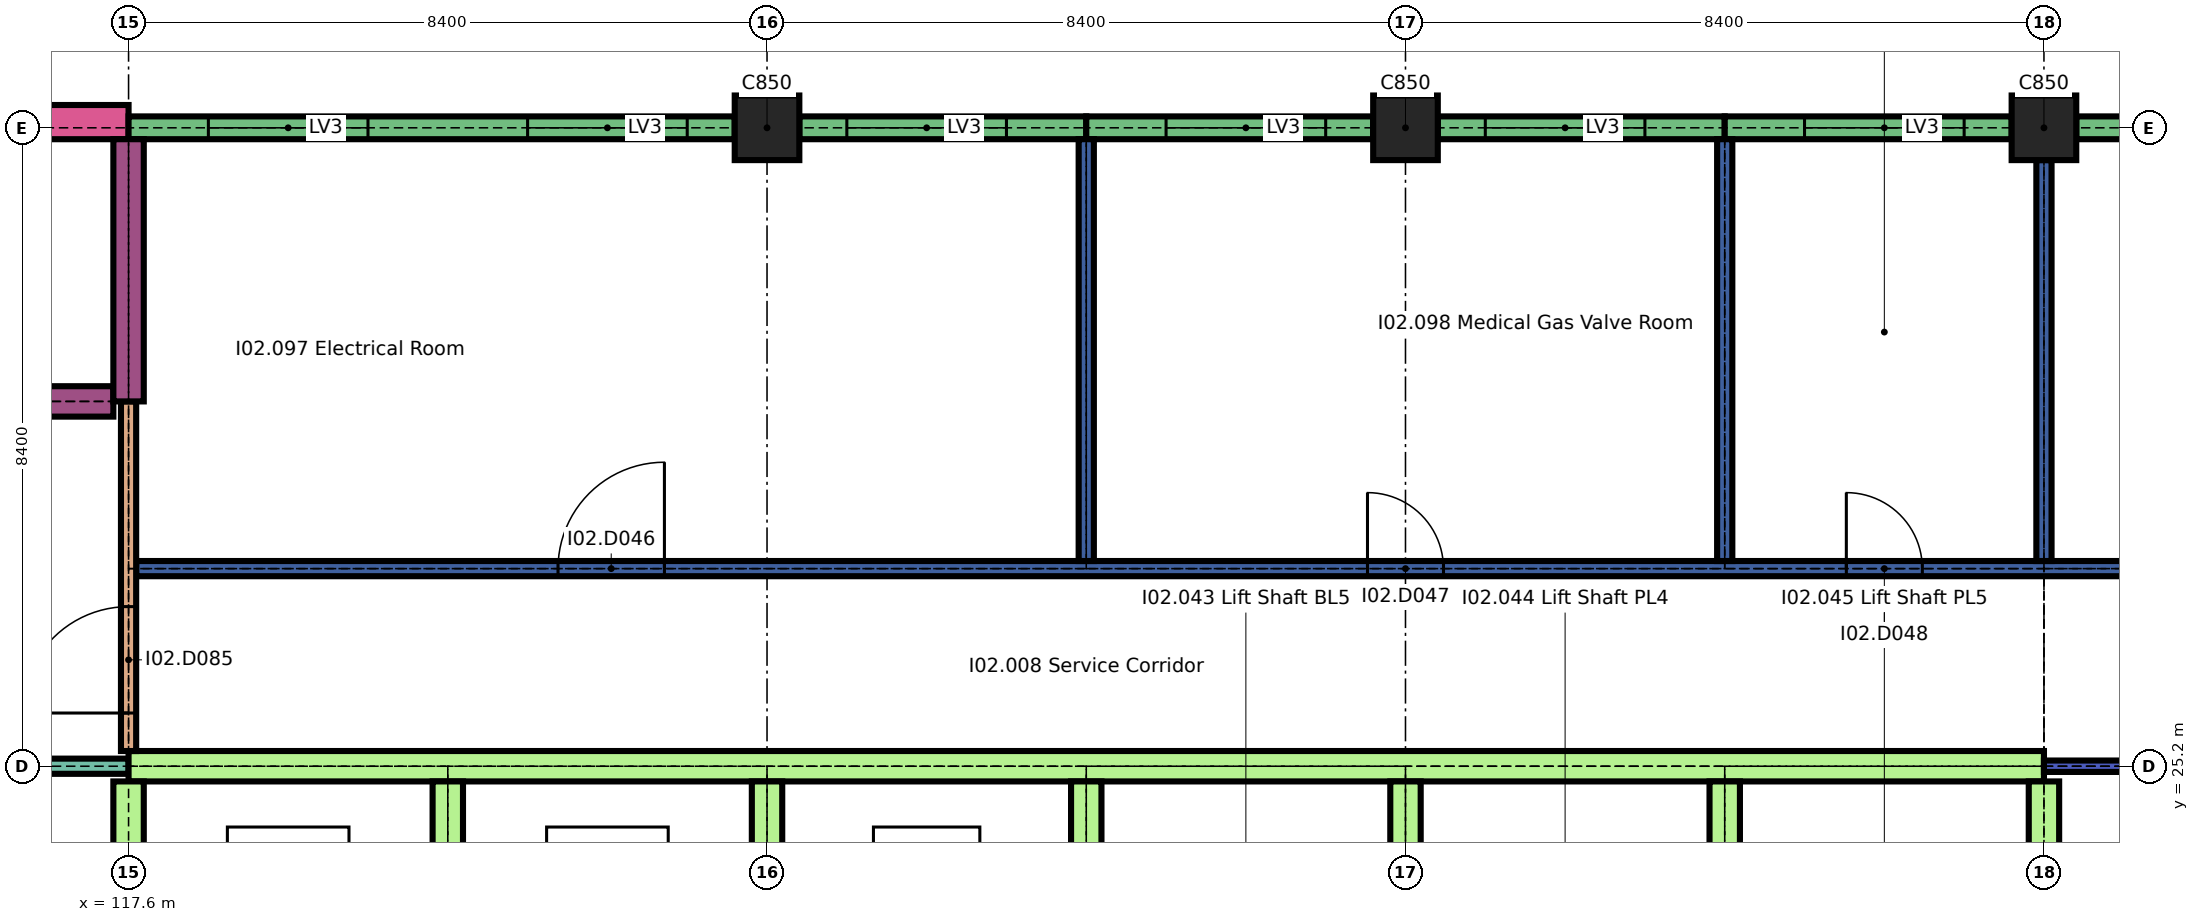
"""IFC4 building model, lengths in metres.
Left out: names, types, materials, properties, quantities, classifications, styles, units other than length and angle.
Written with IfcOpenShell. Run it as: python <this file> out.ifc"""

import sys

from ifc_helpers import new_model, si_unit, direction, frame, frame_2d, origin, origin_2d, place, context, subcontext, project, spatial, rectangle, extrude, element, fill, save


model = new_model("IFC4")
c1 = context("Model", 3, precision=1e-05, world=origin(), true_north=direction((0.0, 1.0)))
c2 = subcontext(c1, "Body", "Model", "MODEL_VIEW")
j1 = project(units=[si_unit("LENGTHUNIT", "METRE"), si_unit("PLANEANGLEUNIT", "RADIAN")], contexts=[c1])
p1 = place(None, origin())
s1 = spatial("IfcSite", under=j1, at=p1, CompositionType="ELEMENT")
p2 = place(p1, origin())
s2 = spatial("IfcBuilding", under=s1, at=p2, CompositionType="ELEMENT")
p3 = place(p2, frame((0.0, 0.0, 12.9)))
s3 = spatial("IfcBuildingStorey", under=s2, at=p3, CompositionType="ELEMENT", Elevation=12.9)
for number, where, z_axis, x_axis in (
    (1, (126.0, 33.6, 0.0), (0.0, 0.0, 1.0), (1.0, 0.0, 0.0)),
    (2, (134.4, 33.6, 0.0), (0.0, 0.0, 1.0), (1.0, 0.0, 0.0)),
    (3, (142.8, 33.6, 0.0), (0.0, 0.0, 1.0), (1.0, 0.0, 0.0)),
):
    element("IfcColumn", number, at=place(p3, frame(where, z_axis=z_axis, x_axis=x_axis)), inside=s3, PredefinedType="COLUMN", context=c2, shape_type="SweptSolid", body=[
        extrude(rectangle(XDim=0.85, YDim=0.85, at=origin_2d()), origin(), (0.0, 0.0, 1.0), 2.04),
    ])
p4 = place(p3, frame((113.75, 33.675, 0.0), z_axis=(0.0, 0.0, 1.0), x_axis=(1.0, 0.0, 0.0)))
e4 = element("IfcWall", 4, at=p4, inside=s3, PredefinedType="SOLIDWALL", context=c2, shape_type="SweptSolid", body=[
    extrude(rectangle(XDim=3.85, YDim=0.45, at=frame_2d((1.925, 0.0))), origin(), (0.0, 0.0, 1.0), 2.1),
])
p5 = place(p3, frame((117.6, 33.6, 0.0), z_axis=(0.0, 0.0, 1.0), x_axis=(1.0, 0.0, 0.0)))
e5 = element("IfcWall", 5, at=p5, inside=s3, PredefinedType="SOLIDWALL", context=c2, shape_type="SweptSolid", body=[
    extrude(rectangle(XDim=7.975, YDim=0.3, at=frame_2d((3.987, 0.0))), origin(), (0.0, 0.0, 1.0), 1.74),
])
p6 = place(p5, frame((1.05, 0.0, 0.6)))
e6 = element("IfcOpeningElement", 6, at=p6, cuts=e5, PredefinedType="OPENING", context=c2, shape_type="SweptSolid", body=[
    extrude(rectangle(XDim=2.1, YDim=1.05, at=frame_2d((1.05, 0.525))), frame((0.0, 0.16, 0.0), z_axis=(0.0, -1.0, 0.0), x_axis=(1.0, 0.0, 0.0)), (0.0, 0.0, 1.0), 0.32),
])
p7 = place(p5, frame((5.25, 0.0, 0.6)))
e7 = element("IfcOpeningElement", 7, at=p7, cuts=e5, PredefinedType="OPENING", context=c2, shape_type="SweptSolid", body=[
    extrude(rectangle(XDim=2.1, YDim=1.05, at=frame_2d((1.05, 0.525))), frame((0.0, 0.16, 0.0), z_axis=(0.0, -1.0, 0.0), x_axis=(1.0, 0.0, 0.0)), (0.0, 0.0, 1.0), 0.32),
])
p8 = place(p3, frame((126.425, 33.6, 0.0), z_axis=(0.0, 0.0, 1.0), x_axis=(1.0, 0.0, 0.0)))
e8 = element("IfcWall", 8, at=p8, inside=s3, PredefinedType="SOLIDWALL", context=c2, shape_type="SweptSolid", body=[
    extrude(rectangle(XDim=3.775, YDim=0.3, at=frame_2d((1.887, 0.0))), origin(), (0.0, 0.0, 1.0), 1.74),
])
p9 = place(p8, frame((0.625, 0.0, 0.6)))
e9 = element("IfcOpeningElement", 9, at=p9, cuts=e8, PredefinedType="OPENING", context=c2, shape_type="SweptSolid", body=[
    extrude(rectangle(XDim=2.1, YDim=1.05, at=frame_2d((1.05, 0.525))), frame((0.0, 0.16, 0.0), z_axis=(0.0, -1.0, 0.0), x_axis=(1.0, 0.0, 0.0)), (0.0, 0.0, 1.0), 0.32),
])
p10 = place(p3, frame((130.2, 33.6, 0.0), z_axis=(0.0, 0.0, 1.0), x_axis=(1.0, 0.0, 0.0)))
e10 = element("IfcWall", 10, at=p10, inside=s3, PredefinedType="SOLIDWALL", context=c2, shape_type="SweptSolid", body=[
    extrude(rectangle(XDim=3.775, YDim=0.3, at=frame_2d((1.888, 0.0))), origin(), (0.0, 0.0, 1.0), 1.74),
])
p11 = place(p10, frame((1.05, 0.0, 0.6)))
e11 = element("IfcOpeningElement", 11, at=p11, cuts=e10, PredefinedType="OPENING", context=c2, shape_type="SweptSolid", body=[
    extrude(rectangle(XDim=2.1, YDim=1.05, at=frame_2d((1.05, 0.525))), frame((0.0, 0.16, 0.0), z_axis=(0.0, -1.0, 0.0), x_axis=(1.0, 0.0, 0.0)), (0.0, 0.0, 1.0), 0.32),
])
p12 = place(p3, frame((134.825, 33.6, 0.0), z_axis=(0.0, 0.0, 1.0), x_axis=(1.0, 0.0, 0.0)))
e12 = element("IfcWall", 12, at=p12, inside=s3, PredefinedType="SOLIDWALL", context=c2, shape_type="SweptSolid", body=[
    extrude(rectangle(XDim=3.775, YDim=0.3, at=frame_2d((1.888, 0.0))), origin(), (0.0, 0.0, 1.0), 1.74),
])
p13 = place(p12, frame((0.625, 0.0, 0.6)))
e13 = element("IfcOpeningElement", 13, at=p13, cuts=e12, PredefinedType="OPENING", context=c2, shape_type="SweptSolid", body=[
    extrude(rectangle(XDim=2.1, YDim=1.05, at=frame_2d((1.05, 0.525))), frame((0.0, 0.16, 0.0), z_axis=(0.0, -1.0, 0.0), x_axis=(1.0, 0.0, 0.0)), (0.0, 0.0, 1.0), 0.32),
])
p14 = place(p3, frame((138.6, 33.6, 0.0), z_axis=(0.0, 0.0, 1.0), x_axis=(1.0, 0.0, 0.0)))
e14 = element("IfcWall", 14, at=p14, inside=s3, PredefinedType="SOLIDWALL", context=c2, shape_type="SweptSolid", body=[
    extrude(rectangle(XDim=3.775, YDim=0.3, at=frame_2d((1.887, 0.0))), origin(), (0.0, 0.0, 1.0), 1.74),
])
p15 = place(p14, frame((1.05, 0.0, 0.6)))
e15 = element("IfcOpeningElement", 15, at=p15, cuts=e14, PredefinedType="OPENING", context=c2, shape_type="SweptSolid", body=[
    extrude(rectangle(XDim=2.1, YDim=1.05, at=frame_2d((1.05, 0.525))), frame((0.0, 0.16, 0.0), z_axis=(0.0, -1.0, 0.0), x_axis=(1.0, 0.0, 0.0)), (0.0, 0.0, 1.0), 0.32),
])
p16 = place(p3, frame((143.225, 33.6, 0.0), z_axis=(0.0, 0.0, 1.0), x_axis=(1.0, 0.0, 0.0)))
e16 = element("IfcWall", 16, at=p16, inside=s3, PredefinedType="SOLIDWALL", context=c2, shape_type="SweptSolid", body=[
    extrude(rectangle(XDim=7.55, YDim=0.3, at=frame_2d((3.775, 0.0))), origin(), (0.0, 0.0, 1.0), 1.74),
])
p17 = place(p16, frame((0.625, 0.0, 0.6)))
e17 = element("IfcOpeningElement", 17, at=p17, cuts=e16, PredefinedType="OPENING", context=c2, shape_type="SweptSolid", body=[
    extrude(rectangle(XDim=2.1, YDim=1.05, at=frame_2d((1.05, 0.525))), frame((0.0, 0.16, 0.0), z_axis=(0.0, -1.0, 0.0), x_axis=(1.0, 0.0, 0.0)), (0.0, 0.0, 1.0), 0.32),
])
p18 = place(p3, frame((109.2, 25.2, 0.0), z_axis=(0.0, 0.0, 1.0), x_axis=(1.0, 0.0, 0.0)))
e18 = element("IfcWall", 18, at=p18, inside=s3, PredefinedType="PARTITIONING", context=c2, shape_type="SweptSolid", body=[
    extrude(rectangle(XDim=8.4, YDim=0.2, at=frame_2d((4.2, 0.0))), origin(), (0.0, 0.0, 1.0), 2.04),
])
p19 = place(p3, frame((117.6, 25.2, 0.0), z_axis=(0.0, 0.0, 1.0), x_axis=(1.0, 0.0, 0.0)))
e19 = element("IfcWall", 19, at=p19, inside=s3, PredefinedType="SHEAR", context=c2, shape_type="SweptSolid", body=[
    extrude(rectangle(XDim=25.2, YDim=0.4, at=frame_2d((12.6, 0.0))), origin(), (0.0, 0.0, 1.0), 2.04),
])
p20 = place(p3, frame((142.8, 25.2, 0.0), z_axis=(0.0, 0.0, 1.0), x_axis=(1.0, 0.0, 0.0)))
e20 = element("IfcWall", 20, at=p20, inside=s3, PredefinedType="PARTITIONING", context=c2, shape_type="SweptSolid", body=[
    extrude(rectangle(XDim=7.975, YDim=0.15, at=frame_2d((3.987, 0.0))), origin(), (0.0, 0.0, 1.0), 2.04),
])
p21 = place(p3, frame((117.7, 27.8, 0.0), z_axis=(0.0, 0.0, 1.0), x_axis=(1.0, 0.0, 0.0)))
e21 = element("IfcWall", 21, at=p21, inside=s3, PredefinedType="SOLIDWALL", context=c2, shape_type="SweptSolid", body=[
    extrude(rectangle(XDim=39.4, YDim=0.2, at=frame_2d((19.7, 0.0))), origin(), (0.0, 0.0, 1.0), 2.1),
])
p22 = place(p21, frame((5.55, 0.0, 0.0)))
e22 = element("IfcOpeningElement", 22, at=p22, cuts=e21, PredefinedType="OPENING", context=c2, shape_type="SweptSolid", body=[
    extrude(rectangle(XDim=1.4, YDim=2.0, at=frame_2d((0.7, 1.0))), frame((0.0, 0.11, 0.0), z_axis=(0.0, -1.0, 0.0), x_axis=(1.0, 0.0, 0.0)), (0.0, 0.0, 1.0), 0.22),
])
p23 = place(p21, frame((16.2, 0.0, 0.0)))
e23 = element("IfcOpeningElement", 23, at=p23, cuts=e21, PredefinedType="OPENING", context=c2, shape_type="SweptSolid", body=[
    extrude(rectangle(XDim=1.0, YDim=2.0, at=frame_2d((0.5, 1.0))), frame((0.0, 0.11, 0.0), z_axis=(0.0, -1.0, 0.0), x_axis=(1.0, 0.0, 0.0)), (0.0, 0.0, 1.0), 0.22),
])
p24 = place(p21, frame((22.5, 0.0, 0.0)))
e24 = element("IfcOpeningElement", 24, at=p24, cuts=e21, PredefinedType="OPENING", context=c2, shape_type="SweptSolid", body=[
    extrude(rectangle(XDim=1.0, YDim=2.0, at=frame_2d((0.5, 1.0))), frame((0.0, 0.11, 0.0), z_axis=(0.0, -1.0, 0.0), x_axis=(1.0, 0.0, 0.0)), (0.0, 0.0, 1.0), 0.22),
])
p25 = place(p21, frame((28.1, 0.0, 0.0)))
e25 = element("IfcOpeningElement", 25, at=p25, cuts=e21, PredefinedType="OPENING", context=c2, shape_type="SweptSolid", body=[
    extrude(rectangle(XDim=1.0, YDim=2.0, at=frame_2d((0.5, 1.0))), frame((0.0, 0.11, 0.0), z_axis=(0.0, -1.0, 0.0), x_axis=(1.0, 0.0, 0.0)), (0.0, 0.0, 1.0), 0.22),
])
p26 = place(p21, frame((35.2, 0.0, 0.0)))
e26 = element("IfcOpeningElement", 26, at=p26, cuts=e21, PredefinedType="OPENING", context=c2, shape_type="SweptSolid", body=[
    extrude(rectangle(XDim=1.0, YDim=2.0, at=frame_2d((0.5, 1.0))), frame((0.0, 0.11, 0.0), z_axis=(0.0, -1.0, 0.0), x_axis=(1.0, 0.0, 0.0)), (0.0, 0.0, 1.0), 0.22),
])
p27 = place(p3, frame((109.4, 30.0, 0.0), z_axis=(0.0, 0.0, 1.0), x_axis=(1.0, 0.0, 0.0)))
e27 = element("IfcWall", 27, at=p27, inside=s3, PredefinedType="SHEAR", context=c2, shape_type="SweptSolid", body=[
    extrude(rectangle(XDim=8.0, YDim=0.4, at=frame_2d((4.0, 0.0))), origin(), (0.0, 0.0, 1.0), 2.1),
])
p28 = place(p27, frame((0.4, 0.0, 0.0)))
e28 = element("IfcOpeningElement", 28, at=p28, cuts=e27, PredefinedType="OPENING", context=c2, shape_type="SweptSolid", body=[
    extrude(rectangle(XDim=1.2, YDim=2.0, at=frame_2d((0.6, 1.0))), frame((0.0, 0.21, 0.0), z_axis=(0.0, -1.0, 0.0), x_axis=(1.0, 0.0, 0.0)), (0.0, 0.0, 1.0), 0.42),
])
p29 = place(p3, frame((117.6, 21.6, 0.0), z_axis=(0.0, 0.0, 1.0), x_axis=(0.0, 1.0, 0.0)))
e29 = element("IfcWall", 29, at=p29, inside=s3, PredefinedType="SHEAR", context=c2, shape_type="SweptSolid", body=[
    extrude(rectangle(XDim=3.4, YDim=0.4, at=frame_2d((1.7, 0.0))), origin(), (0.0, 0.0, 1.0), 2.04),
])
p30 = place(p3, frame((117.6, 25.4, 0.0), z_axis=(0.0, 0.0, 1.0), x_axis=(0.0, 1.0, 0.0)))
e30 = element("IfcWall", 30, at=p30, inside=s3, PredefinedType="PARTITIONING", context=c2, shape_type="SweptSolid", body=[
    extrude(rectangle(XDim=4.6, YDim=0.2, at=frame_2d((2.3, 0.0))), origin(), (0.0, 0.0, 1.0), 2.1),
])
p31 = place(p30, frame((0.5, 0.0, 0.0)))
e31 = element("IfcOpeningElement", 31, at=p31, cuts=e30, PredefinedType="OPENING", context=c2, shape_type="SweptSolid", body=[
    extrude(rectangle(XDim=1.4, YDim=2.0, at=frame_2d((0.7, 1.0))), frame((0.0, 0.11, 0.0), z_axis=(0.0, -1.0, 0.0), x_axis=(1.0, 0.0, 0.0)), (0.0, 0.0, 1.0), 0.22),
])
p32 = place(p3, frame((117.6, 30.0, 0.0), z_axis=(0.0, 0.0, 1.0), x_axis=(0.0, 1.0, 0.0)))
e32 = element("IfcWall", 32, at=p32, inside=s3, PredefinedType="SHEAR", context=c2, shape_type="SweptSolid", body=[
    extrude(rectangle(XDim=3.45, YDim=0.4, at=frame_2d((1.725, 0.0))), origin(), (0.0, 0.0, 1.0), 2.1),
])
for number, where, z_axis, x_axis in (
    (33, (121.8, 21.8, 0.0), (0.0, 0.0, 1.0), (0.0, 1.0, 0.0)),
    (34, (126.0, 21.8, 0.0), (0.0, 0.0, 1.0), (0.0, 1.0, 0.0)),
    (35, (130.2, 21.8, 0.0), (0.0, 0.0, 1.0), (0.0, 1.0, 0.0)),
):
    element("IfcWall", number, at=place(p3, frame(where, z_axis=z_axis, x_axis=x_axis)), inside=s3, PredefinedType="SHEAR", context=c2, shape_type="SweptSolid", body=[
        extrude(rectangle(XDim=3.2, YDim=0.4, at=frame_2d((1.6, 0.0))), origin(), (0.0, 0.0, 1.0), 2.04),
    ])
p33 = place(p3, frame((130.2, 27.9, 0.0), z_axis=(0.0, 0.0, 1.0), x_axis=(0.0, 1.0, 0.0)))
e36 = element("IfcWall", 36, at=p33, inside=s3, PredefinedType="SOLIDWALL", context=c2, shape_type="SweptSolid", body=[
    extrude(rectangle(XDim=5.55, YDim=0.2, at=frame_2d((2.775, 0.0))), origin(), (0.0, 0.0, 1.0), 2.1),
])
for number, where, z_axis, x_axis in (
    (37, (134.4, 21.8, 0.0), (0.0, 0.0, 1.0), (0.0, 1.0, 0.0)),
    (38, (138.6, 21.8, 0.0), (0.0, 0.0, 1.0), (0.0, 1.0, 0.0)),
):
    element("IfcWall", number, at=place(p3, frame(where, z_axis=z_axis, x_axis=x_axis)), inside=s3, PredefinedType="SHEAR", context=c2, shape_type="SweptSolid", body=[
        extrude(rectangle(XDim=3.2, YDim=0.4, at=frame_2d((1.6, 0.0))), origin(), (0.0, 0.0, 1.0), 2.04),
    ])
p34 = place(p3, frame((138.6, 27.9, 0.0), z_axis=(0.0, 0.0, 1.0), x_axis=(0.0, 1.0, 0.0)))
e39 = element("IfcWall", 39, at=p34, inside=s3, PredefinedType="SOLIDWALL", context=c2, shape_type="SweptSolid", body=[
    extrude(rectangle(XDim=5.55, YDim=0.2, at=frame_2d((2.775, 0.0))), origin(), (0.0, 0.0, 1.0), 2.1),
])
p35 = place(p3, frame((142.8, 21.6, 0.0), z_axis=(0.0, 0.0, 1.0), x_axis=(0.0, 1.0, 0.0)))
e40 = element("IfcWall", 40, at=p35, inside=s3, PredefinedType="SHEAR", context=c2, shape_type="SweptSolid", body=[
    extrude(rectangle(XDim=3.4, YDim=0.4, at=frame_2d((1.7, 0.0))), origin(), (0.0, 0.0, 1.0), 2.04),
])
p36 = place(p3, frame((142.8, 27.9, 0.0), z_axis=(0.0, 0.0, 1.0), x_axis=(0.0, 1.0, 0.0)))
e41 = element("IfcWall", 41, at=p36, inside=s3, PredefinedType="SOLIDWALL", context=c2, shape_type="SweptSolid", body=[
    extrude(rectangle(XDim=5.275, YDim=0.2, at=frame_2d((2.638, 0.0))), origin(), (0.0, 0.0, 1.0), 2.1),
])
p37 = place(p6, origin())
e42 = element("IfcWindow", 42, at=p37, inside=s3, PartitioningType="SINGLE_PANEL", PredefinedType="WINDOW", context=c2, shape_type="SweptSolid", body=[
    extrude(rectangle(XDim=2.1, YDim=1.05, at=frame_2d((1.05, 0.525))), frame((0.0, 0.075, 0.0), z_axis=(0.0, -1.0, 0.0), x_axis=(1.0, 0.0, 0.0)), (0.0, 0.0, 1.0), 0.15),
])
fill(e6, e42)
p38 = place(p7, origin())
e43 = element("IfcWindow", 43, at=p38, inside=s3, PartitioningType="SINGLE_PANEL", PredefinedType="WINDOW", context=c2, shape_type="SweptSolid", body=[
    extrude(rectangle(XDim=2.1, YDim=1.05, at=frame_2d((1.05, 0.525))), frame((0.0, 0.075, 0.0), z_axis=(0.0, -1.0, 0.0), x_axis=(1.0, 0.0, 0.0)), (0.0, 0.0, 1.0), 0.15),
])
fill(e7, e43)
p39 = place(p9, origin())
e44 = element("IfcWindow", 44, at=p39, inside=s3, PartitioningType="SINGLE_PANEL", PredefinedType="WINDOW", context=c2, shape_type="SweptSolid", body=[
    extrude(rectangle(XDim=2.1, YDim=1.05, at=frame_2d((1.05, 0.525))), frame((0.0, 0.075, 0.0), z_axis=(0.0, -1.0, 0.0), x_axis=(1.0, 0.0, 0.0)), (0.0, 0.0, 1.0), 0.15),
])
fill(e9, e44)
p40 = place(p11, origin())
e45 = element("IfcWindow", 45, at=p40, inside=s3, PartitioningType="SINGLE_PANEL", PredefinedType="WINDOW", context=c2, shape_type="SweptSolid", body=[
    extrude(rectangle(XDim=2.1, YDim=1.05, at=frame_2d((1.05, 0.525))), frame((0.0, 0.075, 0.0), z_axis=(0.0, -1.0, 0.0), x_axis=(1.0, 0.0, 0.0)), (0.0, 0.0, 1.0), 0.15),
])
fill(e11, e45)
p41 = place(p13, origin())
e46 = element("IfcWindow", 46, at=p41, inside=s3, PartitioningType="SINGLE_PANEL", PredefinedType="WINDOW", context=c2, shape_type="SweptSolid", body=[
    extrude(rectangle(XDim=2.1, YDim=1.05, at=frame_2d((1.05, 0.525))), frame((0.0, 0.075, 0.0), z_axis=(0.0, -1.0, 0.0), x_axis=(1.0, 0.0, 0.0)), (0.0, 0.0, 1.0), 0.15),
])
fill(e13, e46)
p42 = place(p15, origin())
e47 = element("IfcWindow", 47, at=p42, inside=s3, PartitioningType="SINGLE_PANEL", PredefinedType="WINDOW", context=c2, shape_type="SweptSolid", body=[
    extrude(rectangle(XDim=2.1, YDim=1.05, at=frame_2d((1.05, 0.525))), frame((0.0, 0.075, 0.0), z_axis=(0.0, -1.0, 0.0), x_axis=(1.0, 0.0, 0.0)), (0.0, 0.0, 1.0), 0.15),
])
fill(e15, e47)
p43 = place(p22, origin())
e48 = element("IfcDoor", 48, at=p43, inside=s3, OperationType="SINGLE_SWING_LEFT", PredefinedType="DOOR", context=c2, shape_type="SweptSolid", body=[
    extrude(rectangle(XDim=1.4, YDim=2.0, at=frame_2d((0.7, 1.0))), frame((0.0, 0.025, 0.0), z_axis=(0.0, -1.0, 0.0), x_axis=(1.0, 0.0, 0.0)), (0.0, 0.0, 1.0), 0.05),
])
fill(e22, e48)
p44 = place(p23, origin())
e49 = element("IfcDoor", 49, at=p44, inside=s3, OperationType="SINGLE_SWING_RIGHT", PredefinedType="DOOR", context=c2, shape_type="SweptSolid", body=[
    extrude(rectangle(XDim=1.0, YDim=2.0, at=frame_2d((0.5, 1.0))), frame((0.0, 0.025, 0.0), z_axis=(0.0, -1.0, 0.0), x_axis=(1.0, 0.0, 0.0)), (0.0, 0.0, 1.0), 0.05),
])
fill(e23, e49)
p45 = place(p24, origin())
e50 = element("IfcDoor", 50, at=p45, inside=s3, OperationType="SINGLE_SWING_RIGHT", PredefinedType="DOOR", context=c2, shape_type="SweptSolid", body=[
    extrude(rectangle(XDim=1.0, YDim=2.0, at=frame_2d((0.5, 1.0))), frame((0.0, 0.025, 0.0), z_axis=(0.0, -1.0, 0.0), x_axis=(1.0, 0.0, 0.0)), (0.0, 0.0, 1.0), 0.05),
])
fill(e24, e50)
p46 = place(p31, origin())
e51 = element("IfcDoor", 51, at=p46, inside=s3, OperationType="SINGLE_SWING_RIGHT", PredefinedType="DOOR", context=c2, shape_type="SweptSolid", body=[
    extrude(rectangle(XDim=1.4, YDim=2.0, at=frame_2d((0.7, 1.0))), frame((0.0, 0.03, 0.0), z_axis=(0.0, -1.0, 0.0), x_axis=(1.0, 0.0, 0.0)), (0.0, 0.0, 1.0), 0.06),
])
fill(e31, e51)
save(model, sys.argv[1])
